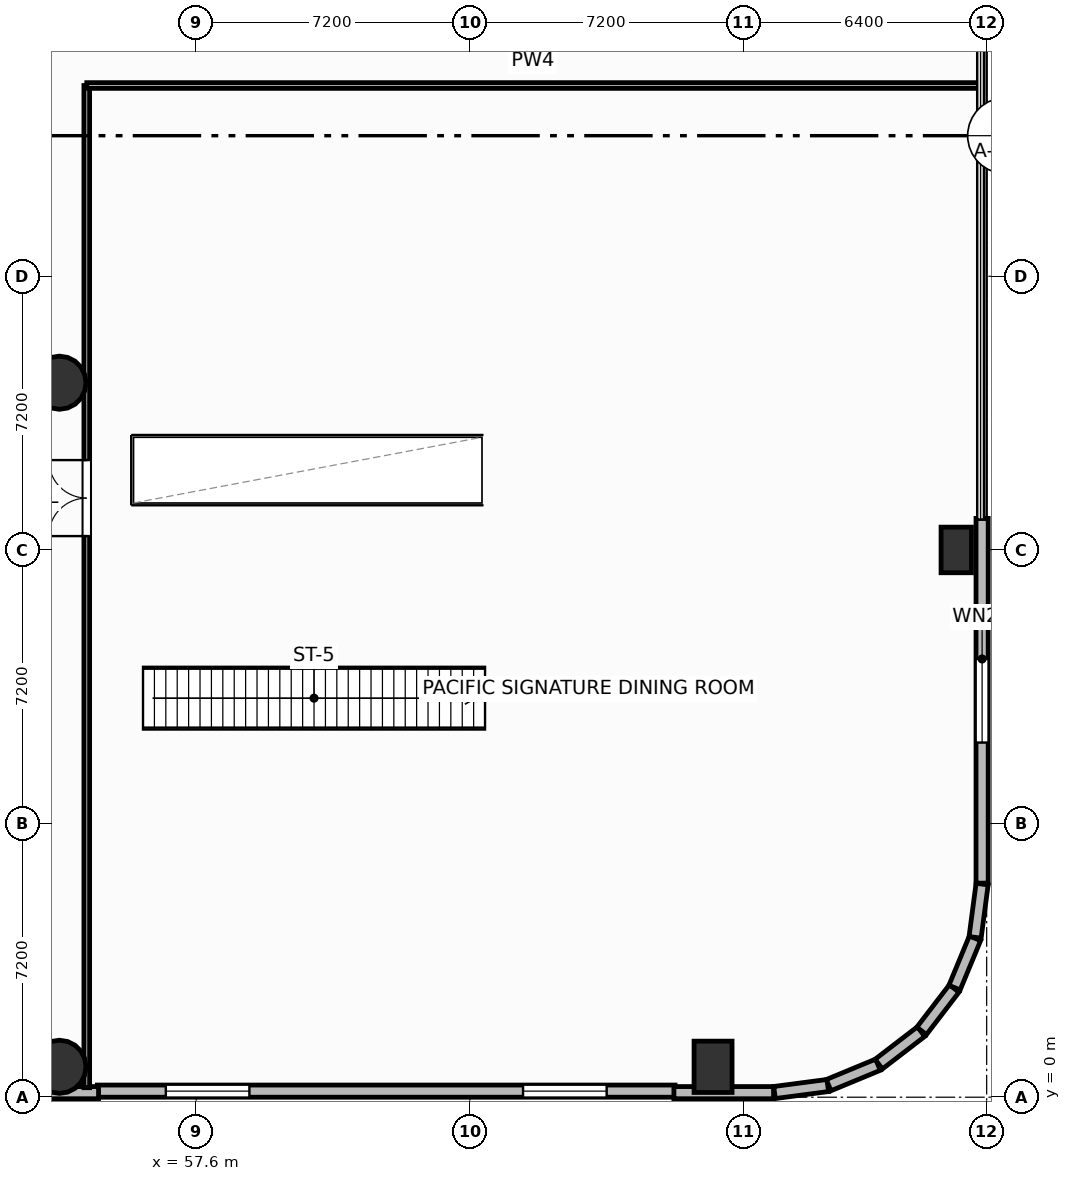
"""IFC4 building model, lengths in metres.
Left out: names, types, materials, properties, quantities, classifications, styles, units other than length and angle.
Written with IfcOpenShell. Run it as: python <this file> out.ifc"""

import sys

from ifc_helpers import new_model, si_unit, direction, frame, frame_2d, origin, origin_2d, place, context, subcontext, project, spatial, rectangle, circle, extrude, element, fill, save


model = new_model("IFC4")
c1 = context("Model", 3, precision=1e-05, world=origin(), true_north=direction((0.0, 1.0)))
c2 = subcontext(c1, "Body", "Model", "MODEL_VIEW")
j1 = project(units=[si_unit("LENGTHUNIT", "METRE"), si_unit("PLANEANGLEUNIT", "RADIAN")], contexts=[c1])
p1 = place(None, origin())
s1 = spatial("IfcSite", under=j1, at=p1, CompositionType="ELEMENT")
p2 = place(p1, origin())
s2 = spatial("IfcBuilding", under=s1, at=p2, CompositionType="ELEMENT")
p3 = place(p2, frame((0.0, 0.0, 10.8)))
s3 = spatial("IfcBuildingStorey", under=s2, at=p3, CompositionType="ELEMENT", Elevation=10.8)
p4 = place(p3, frame((54.0, 0.8, 0.0), z_axis=(0.0, 0.0, 1.0), x_axis=(1.0, 0.0, 0.0)))
e1 = element("IfcColumn", 1, at=p4, inside=s3, PredefinedType="COLUMN", context=c2, shape_type="SweptSolid", body=[
    extrude(circle(Radius=0.7, at=origin_2d()), origin(), (0.0, 0.0, 1.0), 5.4),
])
p5 = place(p3, frame((71.2, 0.8, 0.0), z_axis=(0.0, 0.0, 1.0), x_axis=(1.0, 0.0, 0.0)))
e2 = element("IfcColumn", 2, at=p5, inside=s3, PredefinedType="COLUMN", context=c2, shape_type="SweptSolid", body=[
    extrude(rectangle(XDim=1.0, YDim=1.35, at=origin_2d()), origin(), (0.0, 0.0, 1.0), 5.4),
])
p6 = place(p3, frame((54.0, 18.8, 0.0), z_axis=(0.0, 0.0, 1.0), x_axis=(1.0, 0.0, 0.0)))
e3 = element("IfcColumn", 3, at=p6, inside=s3, PredefinedType="COLUMN", context=c2, shape_type="SweptSolid", body=[
    extrude(circle(Radius=0.7, at=origin_2d()), origin(), (0.0, 0.0, 1.0), 5.4),
])
p7 = place(p3, frame((77.6, 14.4, 0.0), z_axis=(0.0, 0.0, 1.0), x_axis=(1.0, 0.0, 0.0)))
e4 = element("IfcColumn", 4, at=p7, inside=s3, PredefinedType="PILASTER", context=c2, shape_type="SweptSolid", body=[
    extrude(rectangle(XDim=0.8, YDim=1.2, at=origin_2d()), origin(), (0.0, 0.0, 1.0), 5.4),
])
p8 = place(p3, frame((70.2, 0.16, 0.0), z_axis=(0.0, 0.0, 1.0), x_axis=(-1.0, 0.0, 0.0)))
e5 = element("IfcWall", 5, at=p8, inside=s3, PredefinedType="SOLIDWALL", context=c2, shape_type="SweptSolid", body=[
    extrude(rectangle(XDim=15.2, YDim=0.32, at=frame_2d((7.6, 0.0))), origin(), (0.0, 0.0, 1.0), 4.07),
])
p9 = place(p8, frame((1.8, 0.0, 0.8)))
e6 = element("IfcOpeningElement", 6, at=p9, cuts=e5, PredefinedType="OPENING", context=c2, shape_type="SweptSolid", body=[
    extrude(rectangle(XDim=2.2, YDim=1.85, at=frame_2d((1.1, 0.925))), frame((0.0, 0.17, 0.0), z_axis=(0.0, -1.0, 0.0), x_axis=(1.0, 0.0, 0.0)), (0.0, 0.0, 1.0), 0.34),
])
p10 = place(p8, frame((11.2, 0.0, 0.8)))
e7 = element("IfcOpeningElement", 7, at=p10, cuts=e5, PredefinedType="OPENING", context=c2, shape_type="SweptSolid", body=[
    extrude(rectangle(XDim=2.2, YDim=1.85, at=frame_2d((1.1, 0.925))), frame((0.0, 0.17, 0.0), z_axis=(0.0, -1.0, 0.0), x_axis=(1.0, 0.0, 0.0)), (0.0, 0.0, 1.0), 0.34),
])
p11 = place(p3, frame((52.97, 0.12, 0.0), z_axis=(0.0, 0.0, 1.0), x_axis=(1.0, 0.0, 0.0)))
e8 = element("IfcWall", 8, at=p11, inside=s3, PredefinedType="SOLIDWALL", context=c2, shape_type="SweptSolid", body=[
    extrude(rectangle(XDim=2.06, YDim=0.32, at=frame_2d((1.03, 0.0))), origin(), (0.0, 0.0, 1.0), 4.07),
])
p12 = place(p3, frame((70.17, 0.12, 0.0), z_axis=(0.0, 0.0, 1.0), x_axis=(1.0, 0.0, 0.0)))
e9 = element("IfcWall", 9, at=p12, inside=s3, PredefinedType="SOLIDWALL", context=c2, shape_type="SweptSolid", body=[
    extrude(rectangle(XDim=2.622, YDim=0.32, at=frame_2d((1.311, 0.0))), origin(), (0.0, 0.0, 1.0), 4.07),
])
p13 = place(p3, frame((72.817, 0.123, 0.0), z_axis=(0.0, 0.0, 1.0), x_axis=(0.991457235349, 0.130432168094, 0.0)))
e10 = element("IfcWall", 10, at=p13, inside=s3, PredefinedType="SOLIDWALL", context=c2, shape_type="SweptSolid", body=[
    extrude(rectangle(XDim=1.413, YDim=0.32, at=frame_2d((0.707, 0.0))), origin(), (0.0, 0.0, 1.0), 4.07),
])
for number, where, z_axis, x_axis in (
    (11, (74.241, 0.317, 0.0), (0.0, 0.0, 1.0), (0.924, 0.383, 0.0)),
    (12, (75.559, 0.87, 0.0), (0.0, 0.0, 1.0), (0.793, 0.609, 0.0)),
    (13, (76.689, 1.746, 0.0), (0.0, 0.0, 1.0), (0.609, 0.793, 0.0)),
    (14, (77.554, 2.884, 0.0), (0.0, 0.0, 1.0), (0.383, 0.924, 0.0)),
):
    element("IfcWall", number, at=place(p3, frame(where, z_axis=z_axis, x_axis=x_axis)), inside=s3, PredefinedType="SOLIDWALL", context=c2, shape_type="SweptSolid", body=[
        extrude(rectangle(XDim=1.405, YDim=0.32, at=frame_2d((0.703, 0.0))), origin(), (0.0, 0.0, 1.0), 4.07),
    ])
p14 = place(p3, frame((78.096, 4.207, 0.0), z_axis=(0.0, 0.0, 1.0), x_axis=(0.130432168094, 0.991457235349, 0.0)))
e15 = element("IfcWall", 15, at=p14, inside=s3, PredefinedType="SOLIDWALL", context=c2, shape_type="SweptSolid", body=[
    extrude(rectangle(XDim=1.413, YDim=0.32, at=frame_2d((0.707, 0.0))), origin(), (0.0, 0.0, 1.0), 4.07),
])
p15 = place(p3, frame((78.28, 5.633, 0.0), z_axis=(0.0, 0.0, 1.0), x_axis=(0.0, 1.0, 0.0)))
e16 = element("IfcWall", 16, at=p15, inside=s3, PredefinedType="SOLIDWALL", context=c2, shape_type="SweptSolid", body=[
    extrude(rectangle(XDim=9.597, YDim=0.32, at=frame_2d((4.799, 0.0))), origin(), (0.0, 0.0, 1.0), 4.07),
])
p16 = place(p15, frame((3.698, 0.0, 0.8)))
e17 = element("IfcOpeningElement", 17, at=p16, cuts=e16, PredefinedType="OPENING", context=c2, shape_type="SweptSolid", body=[
    extrude(rectangle(XDim=2.2, YDim=2.0, at=frame_2d((1.1, 1.0))), frame((0.0, 0.17, 0.0), z_axis=(0.0, -1.0, 0.0), x_axis=(1.0, 0.0, 0.0)), (0.0, 0.0, 1.0), 0.34),
])
p17 = place(p3, frame((54.72, 0.25, 0.0), z_axis=(0.0, 0.0, 1.0), x_axis=(0.0, 1.0, 0.0)))
e18 = element("IfcWall", 18, at=p17, inside=s3, PredefinedType="PARTITIONING", context=c2, shape_type="SweptSolid", body=[
    extrude(rectangle(XDim=26.37, YDim=0.15, at=frame_2d((13.185, 0.0))), origin(), (0.0, 0.0, 1.0), 5.12),
])
p18 = place(p17, frame((14.514, 0.0, 0.0)))
e19 = element("IfcOpeningElement", 19, at=p18, cuts=e18, PredefinedType="OPENING", context=c2, shape_type="SweptSolid", body=[
    extrude(rectangle(XDim=2.0, YDim=2.05, at=frame_2d((1.0, 1.025))), frame((0.0, 0.085, 0.0), z_axis=(0.0, -1.0, 0.0), x_axis=(1.0, 0.0, 0.0)), (0.0, 0.0, 1.0), 0.17),
])
p19 = place(p3, frame((54.72, 26.62, 0.0), z_axis=(0.0, 0.0, 1.0), x_axis=(1.0, 0.0, 0.0)))
e20 = element("IfcWall", 20, at=p19, inside=s3, PredefinedType="PARTITIONING", context=c2, shape_type="SweptSolid", body=[
    extrude(rectangle(XDim=23.48, YDim=0.15, at=frame_2d((11.74, 0.0))), origin(), (0.0, 0.0, 1.0), 5.12),
])
p20 = place(p9, origin())
e21 = element("IfcWindow", 21, at=p20, inside=s3, PartitioningType="SINGLE_PANEL", PredefinedType="WINDOW", context=c2, shape_type="SweptSolid", body=[
    extrude(rectangle(XDim=2.2, YDim=1.85, at=frame_2d((1.1, 0.925))), frame((0.0, 0.03, 0.0), z_axis=(0.0, -1.0, 0.0), x_axis=(1.0, 0.0, 0.0)), (0.0, 0.0, 1.0), 0.06),
])
fill(e6, e21)
p21 = place(p10, origin())
e22 = element("IfcWindow", 22, at=p21, inside=s3, PartitioningType="SINGLE_PANEL", PredefinedType="WINDOW", context=c2, shape_type="SweptSolid", body=[
    extrude(rectangle(XDim=2.2, YDim=1.85, at=frame_2d((1.1, 0.925))), frame((0.0, 0.03, 0.0), z_axis=(0.0, -1.0, 0.0), x_axis=(1.0, 0.0, 0.0)), (0.0, 0.0, 1.0), 0.06),
])
fill(e7, e22)
p22 = place(p16, origin())
e23 = element("IfcWindow", 23, at=p22, inside=s3, PartitioningType="SINGLE_PANEL", PredefinedType="WINDOW", context=c2, shape_type="SweptSolid", body=[
    extrude(rectangle(XDim=2.2, YDim=2.0, at=frame_2d((1.1, 1.0))), frame((0.0, 0.03, 0.0), z_axis=(0.0, -1.0, 0.0), x_axis=(1.0, 0.0, 0.0)), (0.0, 0.0, 1.0), 0.06),
])
fill(e17, e23)
p23 = place(p18, origin())
e24 = element("IfcDoor", 24, at=p23, inside=s3, OperationType="DOUBLE_DOOR_SINGLE_SWING", PredefinedType="DOOR", context=c2, shape_type="SweptSolid", body=[
    extrude(rectangle(XDim=2.0, YDim=2.05, at=frame_2d((1.0, 1.025))), frame((0.0, 0.025, 0.0), z_axis=(0.0, -1.0, 0.0), x_axis=(1.0, 0.0, 0.0)), (0.0, 0.0, 1.0), 0.05),
])
fill(e19, e24)
save(model, sys.argv[1])
